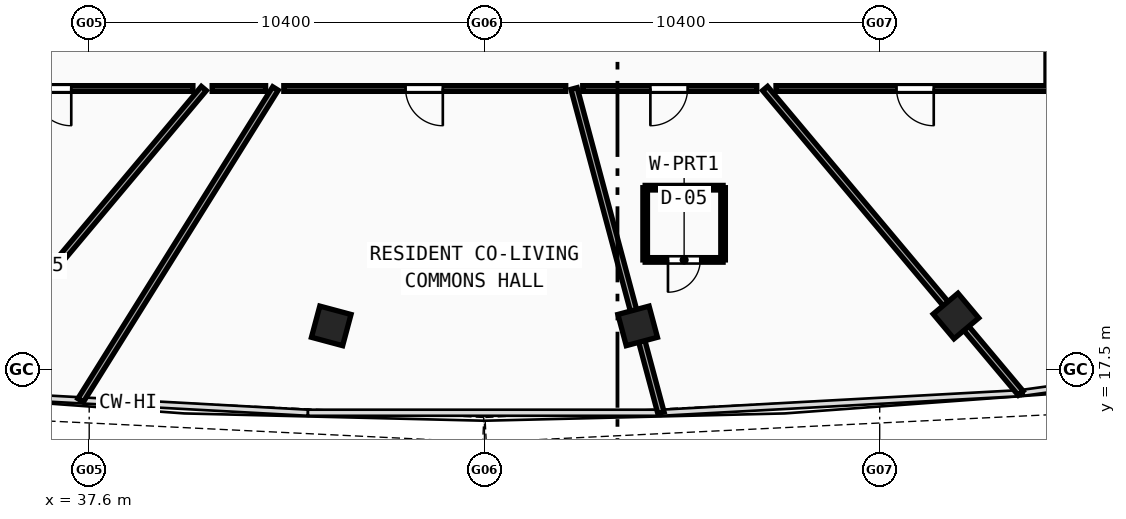
"""IFC4 building model, lengths in metres.
Left out: names, types, materials, properties, quantities, classifications, styles, units other than length and angle.
Written with IfcOpenShell. Run it as: python <this file> out.ifc"""

import sys

from ifc_helpers import new_model, si_unit, direction, frame, frame_2d, origin, origin_with_axes, origin_2d, place, context, subcontext, project, spatial, rectangle, hollow_rectangle, extrude, source, transform, mapped, element, fill, save


model = new_model("IFC4")
c1 = context("Model", 3, precision=1e-05, world=origin(), true_north=direction((0.0, 1.0)))
c2 = subcontext(c1, "Body", "Model", "MODEL_VIEW")
j1 = project(units=[si_unit("LENGTHUNIT", "METRE"), si_unit("PLANEANGLEUNIT", "RADIAN")], contexts=[c1])
p1 = place(None, origin())
s1 = spatial("IfcSite", under=j1, at=p1, CompositionType="ELEMENT")
p2 = place(p1, origin())
s2 = spatial("IfcBuilding", under=s1, at=p2, CompositionType="ELEMENT")
p3 = place(p2, frame((0.0, 0.0, 240.8)))
s3 = spatial("IfcBuildingStorey", under=s2, at=p3, CompositionType="ELEMENT", Elevation=240.8)
m1 = source(origin(), c2, "Body", "SweptSolid", [
    extrude(hollow_rectangle(XDim=0.85, YDim=0.85, WallThickness=0.034, at=origin_2d()), origin(), (0.0, 0.0, 1.0), 3.73),
])
for number, where, z_axis, x_axis in (
    (1, (43.969, 18.654, -0.26), (0.0, 0.0, 1.0), (0.966, -0.259, 0.0)),
    (2, (52.031, 18.654, -0.26), (0.0, 0.0, 1.0), (0.966, 0.259, 0.0)),
    (3, (60.407, 18.914, -0.26), (0.0, 0.0, 1.0), (0.766, 0.643, 0.0)),
):
    element("IfcColumn", number, at=place(p3, frame(where, z_axis=z_axis, x_axis=x_axis)), inside=s3, PredefinedType="COLUMN", context=c2, shape_type="MappedRepresentation", body=[
        mapped(m1, transform((0.0, 0.0, 0.0), scale=1.0)),
    ])
p4 = place(p3, frame((40.616, 24.9, 0.0), z_axis=(0.0, 0.0, 1.0), x_axis=(-0.642788120563, -0.766044014443, 0.0)))
e4 = element("IfcWall", 4, at=p4, inside=s3, PredefinedType="PARTITIONING", context=c2, shape_type="SweptSolid", body=[
    extrude(rectangle(XDim=10.462, YDim=0.17, at=frame_2d((5.231, 0.0))), origin(), (0.0, 0.0, 1.0), 2.82),
])
p5 = place(p3, frame((42.501, 24.9, 0.0), z_axis=(0.0, 0.0, 1.0), x_axis=(-0.529930889386, -0.848040831844, 0.0)))
e5 = element("IfcWall", 5, at=p5, inside=s3, PredefinedType="PARTITIONING", context=c2, shape_type="SweptSolid", body=[
    extrude(rectangle(XDim=9.675, YDim=0.17, at=frame_2d((4.837, 0.0))), origin(), (0.0, 0.0, 1.0), 2.82),
])
p6 = place(p3, frame((50.358, 24.9, 0.0), z_axis=(0.0, 0.0, 1.0), x_axis=(0.258813459388, -0.965927322959, 0.0)))
e6 = element("IfcWall", 6, at=p6, inside=s3, PredefinedType="PARTITIONING", context=c2, shape_type="SweptSolid", body=[
    extrude(rectangle(XDim=8.832, YDim=0.17, at=frame_2d((4.416, 0.0))), origin(), (0.0, 0.0, 1.0), 2.82),
])
p7 = place(p3, frame((55.384, 24.9, 0.0), z_axis=(0.0, 0.0, 1.0), x_axis=(0.642788120563, -0.766044014443, 0.0)))
e7 = element("IfcWall", 7, at=p7, inside=s3, PredefinedType="PARTITIONING", context=c2, shape_type="SweptSolid", body=[
    extrude(rectangle(XDim=10.462, YDim=0.17, at=frame_2d((5.231, 0.0))), origin(), (0.0, 0.0, 1.0), 2.82),
])
p8 = place(p3, frame((62.85, 30.858, 0.0), z_axis=(0.0, 0.0, 1.0), x_axis=(0.0, -1.0, 0.0)))
e8 = element("IfcWall", 8, at=p8, inside=s3, PredefinedType="PARTITIONING", context=c2, shape_type="SweptSolid", body=[
    extrude(rectangle(XDim=5.958, YDim=0.15, at=frame_2d((2.979, 0.0))), origin(), (0.0, 0.0, 1.0), 3.12),
])
p9 = place(p3, frame((62.85, 24.9, 0.0), z_axis=(0.0, 0.0, 1.0), x_axis=(-1.0, 0.0, 0.0)))
e9 = element("IfcWall", 9, at=p9, inside=s3, PredefinedType="PARTITIONING", context=c2, shape_type="SweptSolid", body=[
    extrude(rectangle(XDim=7.179, YDim=0.15, at=frame_2d((3.589, 0.0))), origin(), (0.0, 0.0, 1.0), 3.12),
])
p10 = place(p9, frame((3.028, 0.0, 0.0)))
e10 = element("IfcOpeningElement", 10, at=p10, cuts=e9, PredefinedType="OPENING", context=c2, shape_type="SweptSolid", body=[
    extrude(rectangle(XDim=0.98, YDim=2.12, at=frame_2d((0.49, 1.06))), frame((0.0, 0.085, 0.0), z_axis=(0.0, -1.0, 0.0), x_axis=(1.0, 0.0, 0.0)), (0.0, 0.0, 1.0), 0.17),
])
p11 = place(p3, frame((55.164, 24.9, 0.0), z_axis=(0.0, 0.0, 1.0), x_axis=(-1.0, 0.0, 0.0)))
e11 = element("IfcWall", 11, at=p11, inside=s3, PredefinedType="PARTITIONING", context=c2, shape_type="SweptSolid", body=[
    extrude(rectangle(XDim=4.579, YDim=0.15, at=frame_2d((2.289, 0.0))), origin(), (0.0, 0.0, 1.0), 2.82),
])
p12 = place(p11, frame((1.818, 0.0, 0.0)))
e12 = element("IfcOpeningElement", 12, at=p12, cuts=e11, PredefinedType="OPENING", context=c2, shape_type="SweptSolid", body=[
    extrude(rectangle(XDim=0.98, YDim=2.12, at=frame_2d((0.49, 1.06))), frame((0.0, 0.085, 0.0), z_axis=(0.0, -1.0, 0.0), x_axis=(1.0, 0.0, 0.0)), (0.0, 0.0, 1.0), 0.17),
])
p13 = place(p3, frame((50.138, 24.9, 0.0), z_axis=(0.0, 0.0, 1.0), x_axis=(-1.0, 0.0, 0.0)))
e13 = element("IfcWall", 13, at=p13, inside=s3, PredefinedType="PARTITIONING", context=c2, shape_type="SweptSolid", body=[
    extrude(rectangle(XDim=7.417, YDim=0.15, at=frame_2d((3.708, 0.0))), origin(), (0.0, 0.0, 1.0), 2.82),
])
p14 = place(p13, frame((3.234, 0.0, 0.0)))
e14 = element("IfcOpeningElement", 14, at=p14, cuts=e13, PredefinedType="OPENING", context=c2, shape_type="SweptSolid", body=[
    extrude(rectangle(XDim=0.98, YDim=2.12, at=frame_2d((0.49, 1.06))), frame((0.0, 0.085, 0.0), z_axis=(0.0, -1.0, 0.0), x_axis=(1.0, 0.0, 0.0)), (0.0, 0.0, 1.0), 0.17),
])
p15 = place(p3, frame((42.242, 24.9, 0.0), z_axis=(0.0, 0.0, 1.0), x_axis=(-1.0, 0.0, 0.0)))
e15 = element("IfcWall", 15, at=p15, inside=s3, PredefinedType="PARTITIONING", context=c2, shape_type="SweptSolid", body=[
    extrude(rectangle(XDim=1.406, YDim=0.15, at=frame_2d((0.703, 0.0))), origin(), (0.0, 0.0, 1.0), 2.82),
])
p16 = place(p3, frame((40.329, 24.9, 0.0), z_axis=(0.0, 0.0, 1.0), x_axis=(-1.0, 0.0, 0.0)))
e16 = element("IfcWall", 16, at=p16, inside=s3, PredefinedType="PARTITIONING", context=c2, shape_type="SweptSolid", body=[
    extrude(rectangle(XDim=7.179, YDim=0.15, at=frame_2d((3.589, 0.0))), origin(), (0.0, 0.0, 1.0), 3.12),
])
p17 = place(p16, frame((3.201, 0.0, 0.0)))
e17 = element("IfcOpeningElement", 17, at=p17, cuts=e16, PredefinedType="OPENING", context=c2, shape_type="SweptSolid", body=[
    extrude(rectangle(XDim=0.98, YDim=2.12, at=frame_2d((0.49, 1.06))), frame((0.0, 0.085, 0.0), z_axis=(0.0, -1.0, 0.0), x_axis=(1.0, 0.0, 0.0)), (0.0, 0.0, 1.0), 0.17),
])
p18 = place(p3, frame((52.229, 20.39, 0.0), z_axis=(0.0, 0.0, 1.0), x_axis=(1.0, 0.0, 0.0)))
e18 = element("IfcWall", 18, at=p18, inside=s3, PredefinedType="PARTITIONING", context=c2, shape_type="SweptSolid", body=[
    extrude(rectangle(XDim=2.05, YDim=0.12, at=frame_2d((1.025, 0.0))), origin(), (0.0, 0.0, 1.0), 3.47),
])
p19 = place(p18, frame((0.6, 0.0, 0.0)))
e19 = element("IfcOpeningElement", 19, at=p19, cuts=e18, PredefinedType="OPENING", context=c2, shape_type="SweptSolid", body=[
    extrude(rectangle(XDim=0.85, YDim=2.1, at=frame_2d((0.425, 1.05))), frame((0.0, 0.07, 0.0), z_axis=(0.0, -1.0, 0.0), x_axis=(1.0, 0.0, 0.0)), (0.0, 0.0, 1.0), 0.14),
])
p20 = place(p3, frame((54.279, 20.39, 0.0), z_axis=(0.0, 0.0, 1.0), x_axis=(0.0, 1.0, 0.0)))
e20 = element("IfcWall", 20, at=p20, inside=s3, PredefinedType="PARTITIONING", context=c2, shape_type="SweptSolid", body=[
    extrude(rectangle(XDim=1.9, YDim=0.12, at=frame_2d((0.95, 0.0))), origin(), (0.0, 0.0, 1.0), 3.12),
])
p21 = place(p3, frame((54.279, 22.29, 0.0), z_axis=(0.0, 0.0, 1.0), x_axis=(-1.0, 0.0, 0.0)))
e21 = element("IfcWall", 21, at=p21, inside=s3, PredefinedType="PARTITIONING", context=c2, shape_type="SweptSolid", body=[
    extrude(rectangle(XDim=2.05, YDim=0.12, at=frame_2d((1.025, 0.0))), origin(), (0.0, 0.0, 1.0), 3.47),
])
p22 = place(p3, frame((52.229, 22.29, 0.0), z_axis=(0.0, 0.0, 1.0), x_axis=(0.0, -1.0, 0.0)))
e22 = element("IfcWall", 22, at=p22, inside=s3, PredefinedType="PARTITIONING", context=c2, shape_type="SweptSolid", body=[
    extrude(rectangle(XDim=1.9, YDim=0.12, at=frame_2d((0.95, 0.0))), origin(), (0.0, 0.0, 1.0), 3.12),
])
m2 = source(origin(), c2, "Body", "SweptSolid", [
    extrude(rectangle(XDim=0.98, YDim=2.12, at=frame_2d((0.49, 1.06))), frame((0.0, 0.025, 0.0), z_axis=(0.0, -1.0, 0.0), x_axis=(1.0, 0.0, 0.0)), (0.0, 0.0, 1.0), 0.05),
])
p23 = place(p17, origin_with_axes())
e23 = element("IfcDoor", 23, at=p23, inside=s3, OperationType="SINGLE_SWING_LEFT", PredefinedType="DOOR", context=c2, shape_type="MappedRepresentation", body=[
    mapped(m2, transform((0.0, 0.0, 0.0), scale=1.0)),
])
fill(e17, e23)
p24 = place(p14, origin_with_axes())
e24 = element("IfcDoor", 24, at=p24, inside=s3, OperationType="SINGLE_SWING_LEFT", PredefinedType="DOOR", context=c2, shape_type="MappedRepresentation", body=[
    mapped(m2, transform((0.0, 0.0, 0.0), scale=1.0)),
])
fill(e14, e24)
p25 = place(p12, origin_with_axes())
e25 = element("IfcDoor", 25, at=p25, inside=s3, OperationType="SINGLE_SWING_RIGHT", PredefinedType="DOOR", context=c2, shape_type="MappedRepresentation", body=[
    mapped(m2, transform((0.0, 0.0, 0.0), scale=1.0)),
])
fill(e12, e25)
m3 = source(origin(), c2, "Body", "SweptSolid", [
    extrude(rectangle(XDim=0.85, YDim=2.1, at=frame_2d((0.425, 1.05))), frame((0.0, 0.025, 0.0), z_axis=(0.0, -1.0, 0.0), x_axis=(1.0, 0.0, 0.0)), (0.0, 0.0, 1.0), 0.05),
])
p26 = place(p19, frame((0.85, 0.0, 0.0), z_axis=(0.0, 0.0, 1.0), x_axis=(-1.0, 0.0, 0.0)))
e26 = element("IfcDoor", 26, at=p26, inside=s3, OperationType="SINGLE_SWING_RIGHT", PredefinedType="DOOR", context=c2, shape_type="MappedRepresentation", body=[
    mapped(m3, transform((0.0, 0.0, 0.0), scale=1.0)),
])
fill(e19, e26)
p27 = place(p10, origin_with_axes())
e27 = element("IfcDoor", 27, at=p27, inside=s3, OperationType="SINGLE_SWING_LEFT", PredefinedType="DOOR", context=c2, shape_type="MappedRepresentation", body=[
    mapped(m2, transform((0.0, 0.0, 0.0), scale=1.0)),
])
fill(e10, e27)
save(model, sys.argv[1])
